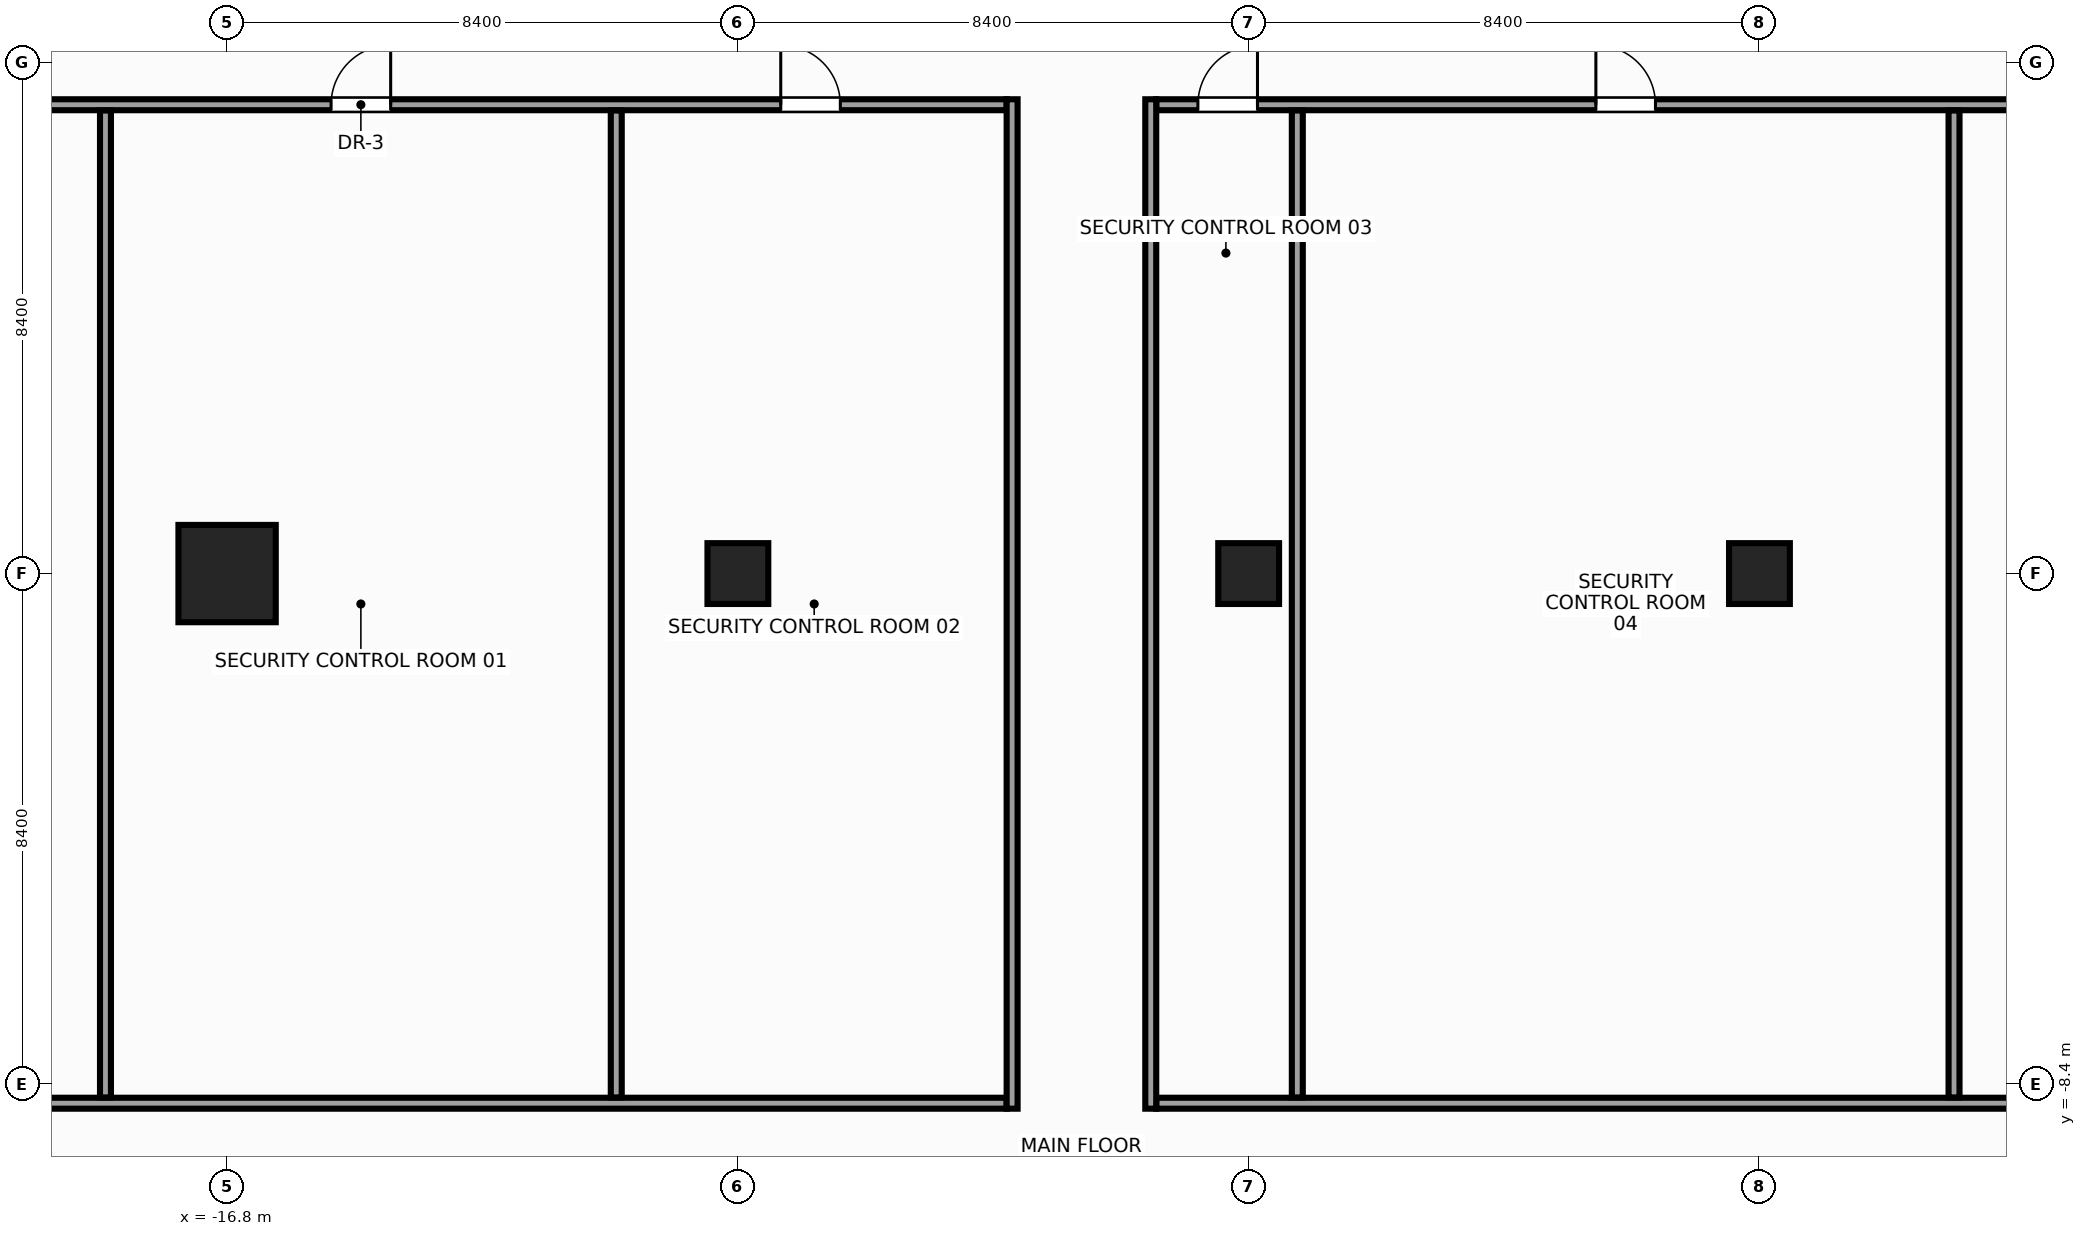
"""IFC4 building model, lengths in metres.
Left out: names, types, materials, properties, quantities, classifications, styles, units other than length and angle.
Written with IfcOpenShell. Run it as: python <this file> out.ifc"""

import sys

from ifc_helpers import new_model, si_unit, direction, frame, frame_2d, origin, origin_with_axes, origin_2d, place, context, subcontext, project, spatial, rectangle, hollow_rectangle, extrude, source, transform, mapped, element, fill, save


model = new_model("IFC4")
c1 = context("Model", 3, precision=1e-05, world=origin(), true_north=direction((0.0, 1.0)))
c2 = subcontext(c1, "Body", "Model", "MODEL_VIEW")
j1 = project(units=[si_unit("LENGTHUNIT", "METRE"), si_unit("PLANEANGLEUNIT", "RADIAN")], contexts=[c1])
p1 = place(None, origin())
s1 = spatial("IfcSite", under=j1, at=p1, CompositionType="ELEMENT")
p2 = place(p1, origin())
s2 = spatial("IfcBuilding", under=s1, at=p2, CompositionType="ELEMENT")
p3 = place(p2, frame((0.0, 0.0, 120.8)))
s3 = spatial("IfcBuildingStorey", under=s2, at=p3, CompositionType="ELEMENT", Elevation=120.8)
m1 = source(origin(), c2, "Body", "SweptSolid", [
    extrude(rectangle(XDim=1.6, YDim=1.6, at=origin_2d()), origin(), (0.0, 0.0, 1.0), 3.6),
])
p4 = place(p3, frame((-16.8, 0.0, 0.0), z_axis=(0.0, 0.0, 1.0), x_axis=(1.0, 0.0, 0.0)))
e1 = element("IfcColumn", 1, at=p4, inside=s3, PredefinedType="COLUMN", context=c2, shape_type="MappedRepresentation", body=[
    mapped(m1, transform((0.0, 0.0, 0.0), x_axis=(1.0, 0.0, 0.0), y_axis=(0.0, 1.0, 0.0), z_axis=(0.0, 0.0, 1.0), scale=1.0)),
])
m2 = source(origin(), c2, "Body", "SweptSolid", [
    extrude(hollow_rectangle(XDim=1.0, YDim=1.0, WallThickness=0.045, at=origin_2d()), origin(), (0.0, 0.0, 1.0), 3.6),
])
for number, where, z_axis, x_axis in (
    (2, (-8.4, 0.0, 0.0), (0.0, 0.0, 1.0), (1.0, 0.0, 0.0)),
    (3, (8.4, 0.0, 0.0), (0.0, 0.0, 1.0), (1.0, 0.0, 0.0)),
):
    element("IfcColumn", number, at=place(p3, frame(where, z_axis=z_axis, x_axis=x_axis)), inside=s3, PredefinedType="COLUMN", context=c2, shape_type="MappedRepresentation", body=[
        mapped(m2, transform((0.0, 0.0, 0.0), x_axis=(1.0, 0.0, 0.0), y_axis=(0.0, 1.0, 0.0), z_axis=(0.0, 0.0, 1.0), scale=1.0)),
    ])
m3 = source(origin(), c2, "Body", "SweptSolid", [
    extrude(rectangle(XDim=1.0, YDim=1.0, at=origin_2d()), origin(), (0.0, 0.0, 1.0), 3.6),
])
p5 = place(p3, origin_with_axes())
e4 = element("IfcColumn", 4, at=p5, inside=s3, PredefinedType="COLUMN", context=c2, shape_type="MappedRepresentation", body=[
    mapped(m3, transform((0.0, 0.0, 0.0), x_axis=(1.0, 0.0, 0.0), y_axis=(0.0, 1.0, 0.0), z_axis=(0.0, 0.0, 1.0), scale=1.0)),
])
m4 = source(origin(), c2, "Body", "SweptSolid", [
    extrude(rectangle(XDim=16.8, YDim=0.18, at=frame_2d((8.4, 0.0))), origin(), (0.0, 0.0, 1.0), 2.685),
])
p6 = place(p3, frame((-20.78, 7.71, 0.0), z_axis=(0.0, 0.0, 1.0), x_axis=(1.0, 0.0, 0.0)))
e5 = element("IfcWall", 5, at=p6, inside=s3, PredefinedType="PARTITIONING", context=c2, shape_type="MappedRepresentation", body=[
    mapped(m4, transform((0.0, 0.0, 0.0), x_axis=(1.0, 0.0, 0.0), y_axis=(0.0, 1.0, 0.0), z_axis=(0.0, 0.0, 1.0), scale=1.0)),
])
p7 = place(p6, frame((5.69, 0.0, 0.0)))
e6 = element("IfcOpeningElement", 6, at=p7, cuts=e5, PredefinedType="OPENING", context=c2, shape_type="SweptSolid", body=[
    extrude(rectangle(XDim=0.98, YDim=2.15, at=frame_2d((0.49, 1.075))), frame((0.0, 0.102, 0.0), z_axis=(0.0, -1.0, 0.0), x_axis=(1.0, 0.0, 0.0)), (0.0, 0.0, 1.0), 0.204),
])
p8 = place(p6, frame((13.085, 0.0, 0.0)))
e7 = element("IfcOpeningElement", 7, at=p8, cuts=e5, PredefinedType="OPENING", context=c2, shape_type="SweptSolid", body=[
    extrude(rectangle(XDim=0.98, YDim=2.15, at=frame_2d((0.49, 1.075))), frame((0.0, 0.102, 0.0), z_axis=(0.0, -1.0, 0.0), x_axis=(1.0, 0.0, 0.0)), (0.0, 0.0, 1.0), 0.204),
])
m5 = source(origin(), c2, "Body", "SweptSolid", [
    extrude(rectangle(XDim=22.3, YDim=0.18, at=frame_2d((11.15, 0.0))), origin(), (0.0, 0.0, 1.0), 2.685),
])
p9 = place(p3, frame((-1.52, 7.71, 0.0), z_axis=(0.0, 0.0, 1.0), x_axis=(1.0, 0.0, 0.0)))
e8 = element("IfcWall", 8, at=p9, inside=s3, PredefinedType="PARTITIONING", context=c2, shape_type="MappedRepresentation", body=[
    mapped(m5, transform((0.0, 0.0, 0.0), x_axis=(1.0, 0.0, 0.0), y_axis=(0.0, 1.0, 0.0), z_axis=(0.0, 0.0, 1.0), scale=1.0)),
])
p10 = place(p9, frame((0.685, 0.0, 0.0)))
e9 = element("IfcOpeningElement", 9, at=p10, cuts=e8, PredefinedType="OPENING", context=c2, shape_type="SweptSolid", body=[
    extrude(rectangle(XDim=0.98, YDim=2.15, at=frame_2d((0.49, 1.075))), frame((0.0, 0.102, 0.0), z_axis=(0.0, -1.0, 0.0), x_axis=(1.0, 0.0, 0.0)), (0.0, 0.0, 1.0), 0.204),
])
p11 = place(p9, frame((7.23, 0.0, 0.0)))
e10 = element("IfcOpeningElement", 10, at=p11, cuts=e8, PredefinedType="OPENING", context=c2, shape_type="SweptSolid", body=[
    extrude(rectangle(XDim=0.98, YDim=2.15, at=frame_2d((0.49, 1.075))), frame((0.0, 0.102, 0.0), z_axis=(0.0, -1.0, 0.0), x_axis=(1.0, 0.0, 0.0)), (0.0, 0.0, 1.0), 0.204),
])
p12 = place(p9, frame((17.195, 0.0, 0.0)))
e11 = element("IfcOpeningElement", 11, at=p12, cuts=e8, PredefinedType="OPENING", context=c2, shape_type="SweptSolid", body=[
    extrude(rectangle(XDim=0.98, YDim=2.15, at=frame_2d((0.49, 1.075))), frame((0.0, 0.102, 0.0), z_axis=(0.0, -1.0, 0.0), x_axis=(1.0, 0.0, 0.0)), (0.0, 0.0, 1.0), 0.204),
])
p13 = place(p3, frame((-20.78, -8.71, 0.0), z_axis=(0.0, 0.0, 1.0), x_axis=(1.0, 0.0, 0.0)))
e12 = element("IfcWall", 12, at=p13, inside=s3, PredefinedType="PARTITIONING", context=c2, shape_type="MappedRepresentation", body=[
    mapped(m4, transform((0.0, 0.0, 0.0), x_axis=(1.0, 0.0, 0.0), y_axis=(0.0, 1.0, 0.0), z_axis=(0.0, 0.0, 1.0), scale=1.0)),
])
p14 = place(p3, frame((-1.52, -8.71, 0.0), z_axis=(0.0, 0.0, 1.0), x_axis=(1.0, 0.0, 0.0)))
e13 = element("IfcWall", 13, at=p14, inside=s3, PredefinedType="PARTITIONING", context=c2, shape_type="MappedRepresentation", body=[
    mapped(m5, transform((0.0, 0.0, 0.0), x_axis=(1.0, 0.0, 0.0), y_axis=(0.0, 1.0, 0.0), z_axis=(0.0, 0.0, 1.0), scale=1.0)),
])
m6 = source(origin(), c2, "Body", "SweptSolid", [
    extrude(rectangle(XDim=16.6, YDim=0.18, at=frame_2d((8.3, 0.0))), origin(), (0.0, 0.0, 1.0), 2.585),
])
for number, where, z_axis, x_axis in (
    (14, (-3.89, -8.8, 0.0), (0.0, 0.0, 1.0), (0.0, 1.0, 0.0)),
    (15, (-1.61, -8.8, 0.0), (0.0, 0.0, 1.0), (0.0, 1.0, 0.0)),
):
    element("IfcWall", number, at=place(p3, frame(where, z_axis=z_axis, x_axis=x_axis)), inside=s3, PredefinedType="PARTITIONING", context=c2, shape_type="MappedRepresentation", body=[
        mapped(m6, transform((0.0, 0.0, 0.0), x_axis=(1.0, 0.0, 0.0), y_axis=(0.0, 1.0, 0.0), z_axis=(0.0, 0.0, 1.0), scale=1.0)),
    ])
m7 = source(origin(), c2, "Body", "SweptSolid", [
    extrude(rectangle(XDim=16.23, YDim=0.18, at=frame_2d((8.115, 0.0))), origin(), (0.0, 0.0, 1.0), 2.685),
])
p15 = place(p3, frame((-18.8, -8.615, 0.0), z_axis=(0.0, 0.0, 1.0), x_axis=(0.0, 1.0, 0.0)))
e16 = element("IfcWall", 16, at=p15, inside=s3, PredefinedType="PARTITIONING", context=c2, shape_type="MappedRepresentation", body=[
    mapped(m7, transform((0.0, 0.0, 0.0), x_axis=(1.0, 0.0, 0.0), y_axis=(0.0, 1.0, 0.0), z_axis=(0.0, 0.0, 1.0), scale=1.0)),
])
m8 = source(origin(), c2, "Body", "SweptSolid", [
    extrude(rectangle(XDim=16.23, YDim=0.18, at=frame_2d((8.115, 0.0))), origin(), (0.0, 0.0, 1.0), 2.585),
])
for number, where, z_axis, x_axis in (
    (17, (-10.4, -8.615, 0.0), (0.0, 0.0, 1.0), (0.0, 1.0, 0.0)),
    (18, (0.8, -8.615, 0.0), (0.0, 0.0, 1.0), (0.0, 1.0, 0.0)),
    (19, (11.6, -8.615, 0.0), (0.0, 0.0, 1.0), (0.0, 1.0, 0.0)),
):
    element("IfcWall", number, at=place(p3, frame(where, z_axis=z_axis, x_axis=x_axis)), inside=s3, PredefinedType="PARTITIONING", context=c2, shape_type="MappedRepresentation", body=[
        mapped(m8, transform((0.0, 0.0, 0.0), x_axis=(1.0, 0.0, 0.0), y_axis=(0.0, 1.0, 0.0), z_axis=(0.0, 0.0, 1.0), scale=1.0)),
    ])
m9 = source(origin(), c2, "Body", "SweptSolid", [
    extrude(rectangle(XDim=0.98, YDim=2.15, at=frame_2d((0.49, 1.075))), frame((0.0, 0.025, 0.0), z_axis=(0.0, -1.0, 0.0), x_axis=(1.0, 0.0, 0.0)), (0.0, 0.0, 1.0), 0.05),
])
p16 = place(p7, origin())
e20 = element("IfcDoor", 20, at=p16, inside=s3, OperationType="SINGLE_SWING_RIGHT", PredefinedType="DOOR", context=c2, shape_type="MappedRepresentation", body=[
    mapped(m9, transform((0.0, 0.0, 0.0), x_axis=(1.0, 0.0, 0.0), y_axis=(0.0, 1.0, 0.0), z_axis=(0.0, 0.0, 1.0), scale=1.0)),
])
fill(e6, e20)
p17 = place(p8, origin())
e21 = element("IfcDoor", 21, at=p17, inside=s3, OperationType="SINGLE_SWING_LEFT", PredefinedType="DOOR", context=c2, shape_type="MappedRepresentation", body=[
    mapped(m9, transform((0.0, 0.0, 0.0), x_axis=(1.0, 0.0, 0.0), y_axis=(0.0, 1.0, 0.0), z_axis=(0.0, 0.0, 1.0), scale=1.0)),
])
fill(e7, e21)
p18 = place(p10, origin())
e22 = element("IfcDoor", 22, at=p18, inside=s3, OperationType="SINGLE_SWING_RIGHT", PredefinedType="DOOR", context=c2, shape_type="MappedRepresentation", body=[
    mapped(m9, transform((0.0, 0.0, 0.0), x_axis=(1.0, 0.0, 0.0), y_axis=(0.0, 1.0, 0.0), z_axis=(0.0, 0.0, 1.0), scale=1.0)),
])
fill(e9, e22)
p19 = place(p11, origin())
e23 = element("IfcDoor", 23, at=p19, inside=s3, OperationType="SINGLE_SWING_LEFT", PredefinedType="DOOR", context=c2, shape_type="MappedRepresentation", body=[
    mapped(m9, transform((0.0, 0.0, 0.0), x_axis=(1.0, 0.0, 0.0), y_axis=(0.0, 1.0, 0.0), z_axis=(0.0, 0.0, 1.0), scale=1.0)),
])
fill(e10, e23)
save(model, sys.argv[1])
